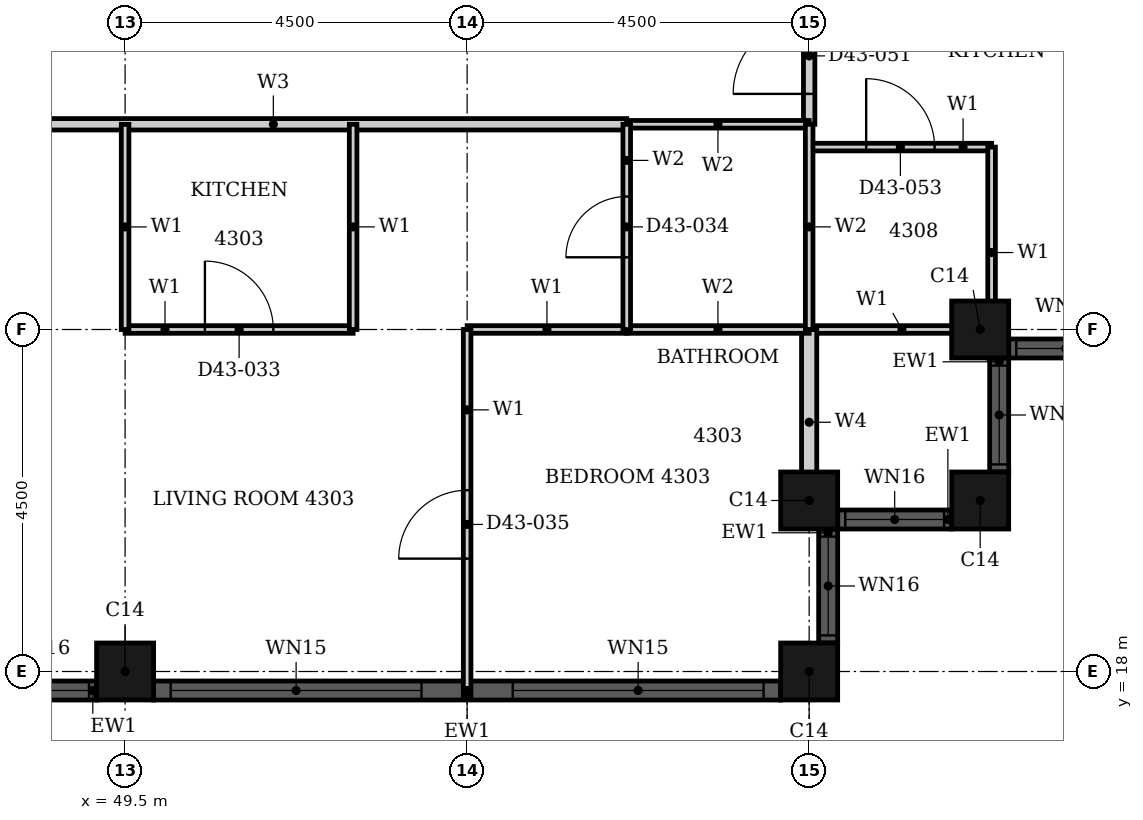
"""IFC4 building model, lengths in metres.
Left out: names, types, materials, properties, quantities, classifications, styles, units other than length and angle.
Written with IfcOpenShell. Run it as: python <this file> out.ifc"""

import sys

from ifc_helpers import new_model, si_unit, direction, frame, frame_2d, origin, origin_2d, place, context, subcontext, project, spatial, rectangle, hollow_rectangle, extrude, element, fill, save


model = new_model("IFC4")
c1 = context("Model", 3, precision=1e-05, world=origin(), true_north=direction((0.0, 1.0)))
c2 = subcontext(c1, "Body", "Model", "MODEL_VIEW")
j1 = project(units=[si_unit("LENGTHUNIT", "METRE"), si_unit("PLANEANGLEUNIT", "RADIAN")], contexts=[c1])
p1 = place(None, origin())
s1 = spatial("IfcSite", under=j1, at=p1, CompositionType="ELEMENT")
p2 = place(p1, origin())
s2 = spatial("IfcBuilding", under=s1, at=p2, CompositionType="ELEMENT")
p3 = place(p2, frame((0.0, 0.0, 172.8)))
s3 = spatial("IfcBuildingStorey", under=s2, at=p3, CompositionType="ELEMENT", Elevation=172.8)
for number, where, z_axis, x_axis in (
    (1, (49.5, 18.0, 0.0), (0.0, 0.0, 1.0), (1.0, 0.0, 0.0)),
    (2, (58.5, 18.0, 0.0), (0.0, 0.0, 1.0), (1.0, 0.0, 0.0)),
    (3, (58.5, 20.25, 0.0), (0.0, 0.0, 1.0), (1.0, 0.0, 0.0)),
    (4, (60.75, 20.25, 0.0), (0.0, 0.0, 1.0), (1.0, 0.0, 0.0)),
    (5, (60.75, 22.5, 0.0), (0.0, 0.0, 1.0), (1.0, 0.0, 0.0)),
):
    element("IfcColumn", number, at=place(p3, frame(where, z_axis=z_axis, x_axis=x_axis)), inside=s3, PredefinedType="COLUMN", context=c2, shape_type="SweptSolid", body=[
        extrude(hollow_rectangle(XDim=0.75, YDim=0.75, WallThickness=0.024, at=origin_2d()), origin(), (0.0, 0.0, 1.0), 3.7),
    ])
p4 = place(p3, frame((47.625, 17.75, 0.0), z_axis=(0.0, 0.0, 1.0), x_axis=(1.0, 0.0, 0.0)))
e6 = element("IfcWall", 6, at=p4, inside=s3, PredefinedType="SOLIDWALL", context=c2, shape_type="SweptSolid", body=[
    extrude(rectangle(XDim=1.5, YDim=0.25, at=frame_2d((0.75, 0.0))), origin(), (0.0, 0.0, 1.0), 3.7),
])
p5 = place(p4, frame((0.1, 0.0, 0.9)))
e7 = element("IfcOpeningElement", 7, at=p5, cuts=e6, PredefinedType="OPENING", context=c2, shape_type="SweptSolid", body=[
    extrude(rectangle(XDim=1.3, YDim=1.85, at=frame_2d((0.65, 0.925))), frame((0.0, 0.135, 0.0), z_axis=(0.0, -1.0, 0.0), x_axis=(1.0, 0.0, 0.0)), (0.0, 0.0, 1.0), 0.27),
])
p6 = place(p3, frame((49.875, 17.75, 0.0), z_axis=(0.0, 0.0, 1.0), x_axis=(1.0, 0.0, 0.0)))
e8 = element("IfcWall", 8, at=p6, inside=s3, PredefinedType="SOLIDWALL", context=c2, shape_type="SweptSolid", body=[
    extrude(rectangle(XDim=8.25, YDim=0.25, at=frame_2d((4.125, 0.0))), origin(), (0.0, 0.0, 1.0), 3.7),
])
p7 = place(p6, frame((0.225, 0.0, 0.45)))
e9 = element("IfcOpeningElement", 9, at=p7, cuts=e8, PredefinedType="OPENING", context=c2, shape_type="SweptSolid", body=[
    extrude(rectangle(XDim=3.3, YDim=2.3, at=frame_2d((1.65, 1.15))), frame((0.0, 0.135, 0.0), z_axis=(0.0, -1.0, 0.0), x_axis=(1.0, 0.0, 0.0)), (0.0, 0.0, 1.0), 0.27),
])
p8 = place(p6, frame((4.725, 0.0, 0.45)))
e10 = element("IfcOpeningElement", 10, at=p8, cuts=e8, PredefinedType="OPENING", context=c2, shape_type="SweptSolid", body=[
    extrude(rectangle(XDim=3.3, YDim=2.3, at=frame_2d((1.65, 1.15))), frame((0.0, 0.135, 0.0), z_axis=(0.0, -1.0, 0.0), x_axis=(1.0, 0.0, 0.0)), (0.0, 0.0, 1.0), 0.27),
])
p9 = place(p3, frame((58.75, 18.375, 0.0), z_axis=(0.0, 0.0, 1.0), x_axis=(0.0, 1.0, 0.0)))
e11 = element("IfcWall", 11, at=p9, inside=s3, PredefinedType="SOLIDWALL", context=c2, shape_type="SweptSolid", body=[
    extrude(rectangle(XDim=1.5, YDim=0.25, at=frame_2d((0.75, 0.0))), origin(), (0.0, 0.0, 1.0), 3.7),
])
p10 = place(p9, frame((0.1, 0.0, 0.9)))
e12 = element("IfcOpeningElement", 12, at=p10, cuts=e11, PredefinedType="OPENING", context=c2, shape_type="SweptSolid", body=[
    extrude(rectangle(XDim=1.3, YDim=1.85, at=frame_2d((0.65, 0.925))), frame((0.0, 0.135, 0.0), z_axis=(0.0, -1.0, 0.0), x_axis=(1.0, 0.0, 0.0)), (0.0, 0.0, 1.0), 0.27),
])
p11 = place(p3, frame((58.875, 20.0, 0.0), z_axis=(0.0, 0.0, 1.0), x_axis=(1.0, 0.0, 0.0)))
e13 = element("IfcWall", 13, at=p11, inside=s3, PredefinedType="SOLIDWALL", context=c2, shape_type="SweptSolid", body=[
    extrude(rectangle(XDim=1.5, YDim=0.25, at=frame_2d((0.75, 0.0))), origin(), (0.0, 0.0, 1.0), 3.7),
])
p12 = place(p11, frame((0.1, 0.0, 0.9)))
e14 = element("IfcOpeningElement", 14, at=p12, cuts=e13, PredefinedType="OPENING", context=c2, shape_type="SweptSolid", body=[
    extrude(rectangle(XDim=1.3, YDim=1.85, at=frame_2d((0.65, 0.925))), frame((0.0, 0.135, 0.0), z_axis=(0.0, -1.0, 0.0), x_axis=(1.0, 0.0, 0.0)), (0.0, 0.0, 1.0), 0.27),
])
p13 = place(p3, frame((61.0, 20.625, 0.0), z_axis=(0.0, 0.0, 1.0), x_axis=(0.0, 1.0, 0.0)))
e15 = element("IfcWall", 15, at=p13, inside=s3, PredefinedType="SOLIDWALL", context=c2, shape_type="SweptSolid", body=[
    extrude(rectangle(XDim=1.5, YDim=0.25, at=frame_2d((0.75, 0.0))), origin(), (0.0, 0.0, 1.0), 3.7),
])
p14 = place(p13, frame((0.1, 0.0, 0.9)))
e16 = element("IfcOpeningElement", 16, at=p14, cuts=e15, PredefinedType="OPENING", context=c2, shape_type="SweptSolid", body=[
    extrude(rectangle(XDim=1.3, YDim=1.85, at=frame_2d((0.65, 0.925))), frame((0.0, 0.135, 0.0), z_axis=(0.0, -1.0, 0.0), x_axis=(1.0, 0.0, 0.0)), (0.0, 0.0, 1.0), 0.27),
])
p15 = place(p3, frame((61.125, 22.25, 0.0), z_axis=(0.0, 0.0, 1.0), x_axis=(1.0, 0.0, 0.0)))
e17 = element("IfcWall", 17, at=p15, inside=s3, PredefinedType="SOLIDWALL", context=c2, shape_type="SweptSolid", body=[
    extrude(rectangle(XDim=1.5, YDim=0.25, at=frame_2d((0.75, 0.0))), origin(), (0.0, 0.0, 1.0), 3.7),
])
p16 = place(p15, frame((0.1, 0.0, 0.9)))
e18 = element("IfcOpeningElement", 18, at=p16, cuts=e17, PredefinedType="OPENING", context=c2, shape_type="SweptSolid", body=[
    extrude(rectangle(XDim=1.3, YDim=1.85, at=frame_2d((0.65, 0.925))), frame((0.0, 0.135, 0.0), z_axis=(0.0, -1.0, 0.0), x_axis=(1.0, 0.0, 0.0)), (0.0, 0.0, 1.0), 0.27),
])
p17 = place(p3, frame((46.801, 25.2, 0.0), z_axis=(0.0, 0.0, 1.0), x_axis=(1.0, 0.0, 0.0)))
e19 = element("IfcWall", 19, at=p17, inside=s3, PredefinedType="PARTITIONING", context=c2, shape_type="SweptSolid", body=[
    extrude(rectangle(XDim=9.299, YDim=0.15, at=frame_2d((4.649, 0.0))), origin(), (0.0, 0.0, 1.0), 3.4),
])
p18 = place(p3, frame((58.5, 25.2, 0.0), z_axis=(0.0, 0.0, 1.0), x_axis=(0.0, 1.0, 0.0)))
e20 = element("IfcWall", 20, at=p18, inside=s3, PredefinedType="PARTITIONING", context=c2, shape_type="SweptSolid", body=[
    extrude(rectangle(XDim=1.8, YDim=0.15, at=frame_2d((0.9, 0.0))), origin(), (0.0, 0.0, 1.0), 3.4),
])
p19 = place(p18, frame((0.4, 0.0, 0.0)))
e21 = element("IfcOpeningElement", 21, at=p19, cuts=e20, PredefinedType="OPENING", context=c2, shape_type="SweptSolid", body=[
    extrude(rectangle(XDim=1.0, YDim=2.2, at=frame_2d((0.5, 1.1))), frame((0.0, 0.085, 0.0), z_axis=(0.0, -1.0, 0.0), x_axis=(1.0, 0.0, 0.0)), (0.0, 0.0, 1.0), 0.17),
])
p20 = place(p3, frame((54.0, 22.5, 0.0), z_axis=(0.0, 0.0, 1.0), x_axis=(1.0, 0.0, 0.0)))
e22 = element("IfcWall", 22, at=p20, inside=s3, PredefinedType="PARTITIONING", context=c2, shape_type="SweptSolid", body=[
    extrude(rectangle(XDim=2.1, YDim=0.1, at=frame_2d((1.05, 0.0))), origin(), (0.0, 0.0, 1.0), 2.68),
])
p21 = place(p3, frame((49.5, 22.5, 0.0), z_axis=(0.0, 0.0, 1.0), x_axis=(1.0, 0.0, 0.0)))
e23 = element("IfcWall", 23, at=p21, inside=s3, PredefinedType="PARTITIONING", context=c2, shape_type="SweptSolid", body=[
    extrude(rectangle(XDim=3.0, YDim=0.1, at=frame_2d((1.5, 0.0))), origin(), (0.0, 0.0, 1.0), 2.68),
])
p22 = place(p21, frame((1.05, 0.0, 0.0)))
e24 = element("IfcOpeningElement", 24, at=p22, cuts=e23, PredefinedType="OPENING", context=c2, shape_type="SweptSolid", body=[
    extrude(rectangle(XDim=0.9, YDim=2.1, at=frame_2d((0.45, 1.05))), frame((0.0, 0.06, 0.0), z_axis=(0.0, -1.0, 0.0), x_axis=(1.0, 0.0, 0.0)), (0.0, 0.0, 1.0), 0.12),
])
p23 = place(p3, frame((58.501, 22.5, 0.0), z_axis=(0.0, 0.0, 1.0), x_axis=(1.0, 0.0, 0.0)))
e25 = element("IfcWall", 25, at=p23, inside=s3, PredefinedType="PARTITIONING", context=c2, shape_type="SweptSolid", body=[
    extrude(rectangle(XDim=2.439, YDim=0.1, at=frame_2d((1.219, 0.0))), origin(), (0.0, 0.0, 1.0), 2.68),
])
p24 = place(p3, frame((58.5, 24.9, 0.0), z_axis=(0.0, 0.0, 1.0), x_axis=(1.0, 0.0, 0.0)))
e26 = element("IfcWall", 26, at=p24, inside=s3, PredefinedType="PARTITIONING", context=c2, shape_type="SweptSolid", body=[
    extrude(rectangle(XDim=2.4, YDim=0.1, at=frame_2d((1.2, 0.0))), origin(), (0.0, 0.0, 1.0), 3.4),
])
p25 = place(p24, frame((0.75, 0.0, 0.0)))
e27 = element("IfcOpeningElement", 27, at=p25, cuts=e26, PredefinedType="OPENING", context=c2, shape_type="SweptSolid", body=[
    extrude(rectangle(XDim=0.9, YDim=2.1, at=frame_2d((0.45, 1.05))), frame((0.0, 0.06, 0.0), z_axis=(0.0, -1.0, 0.0), x_axis=(1.0, 0.0, 0.0)), (0.0, 0.0, 1.0), 0.12),
])
p26 = place(p3, frame((49.5, 22.5, 0.0), z_axis=(0.0, 0.0, 1.0), x_axis=(0.0, 1.0, 0.0)))
e28 = element("IfcWall", 28, at=p26, inside=s3, PredefinedType="PARTITIONING", context=c2, shape_type="SweptSolid", body=[
    extrude(rectangle(XDim=2.699, YDim=0.1, at=frame_2d((1.35, 0.0))), origin(), (0.0, 0.0, 1.0), 2.48),
])
p27 = place(p3, frame((52.5, 22.5, 0.0), z_axis=(0.0, 0.0, 1.0), x_axis=(0.0, 1.0, 0.0)))
e29 = element("IfcWall", 29, at=p27, inside=s3, PredefinedType="PARTITIONING", context=c2, shape_type="SweptSolid", body=[
    extrude(rectangle(XDim=2.7, YDim=0.1, at=frame_2d((1.35, 0.0))), origin(), (0.0, 0.0, 1.0), 3.4),
])
p28 = place(p3, frame((54.0, 17.685, 0.0), z_axis=(0.0, 0.0, 1.0), x_axis=(0.0, 1.0, 0.0)))
e30 = element("IfcWall", 30, at=p28, inside=s3, PredefinedType="PARTITIONING", context=c2, shape_type="SweptSolid", body=[
    extrude(rectangle(XDim=4.815, YDim=0.1, at=frame_2d((2.407, 0.0))), origin(), (0.0, 0.0, 1.0), 3.4),
])
p29 = place(p28, frame((1.8, 0.0, 0.0)))
e31 = element("IfcOpeningElement", 31, at=p29, cuts=e30, PredefinedType="OPENING", context=c2, shape_type="SweptSolid", body=[
    extrude(rectangle(XDim=0.9, YDim=2.1, at=frame_2d((0.45, 1.05))), frame((0.0, 0.06, 0.0), z_axis=(0.0, -1.0, 0.0), x_axis=(1.0, 0.0, 0.0)), (0.0, 0.0, 1.0), 0.12),
])
p30 = place(p3, frame((60.9, 22.125, 0.0), z_axis=(0.0, 0.0, 1.0), x_axis=(0.0, 1.0, 0.0)))
e32 = element("IfcWall", 32, at=p30, inside=s3, PredefinedType="PARTITIONING", context=c2, shape_type="SweptSolid", body=[
    extrude(rectangle(XDim=2.775, YDim=0.1, at=frame_2d((1.387, 0.0))), origin(), (0.0, 0.0, 1.0), 3.4),
])
p31 = place(p3, frame((58.5, 20.06, 0.0), z_axis=(0.0, 0.0, 1.0), x_axis=(0.0, 1.0, 0.0)))
e33 = element("IfcWall", 33, at=p31, inside=s3, PredefinedType="PARTITIONING", context=c2, shape_type="SweptSolid", body=[
    extrude(rectangle(XDim=2.439, YDim=0.2, at=frame_2d((1.219, 0.0))), origin(), (0.0, 0.0, 1.0), 3.4),
])
p32 = place(p3, frame((56.1, 22.5, 0.0), z_axis=(0.0, 0.0, 1.0), x_axis=(1.0, 0.0, 0.0)))
e34 = element("IfcWall", 34, at=p32, inside=s3, PredefinedType="PARTITIONING", context=c2, shape_type="SweptSolid", body=[
    extrude(rectangle(XDim=2.4, YDim=0.1, at=frame_2d((1.2, 0.0))), origin(), (0.0, 0.0, 1.0), 2.68),
])
p33 = place(p3, frame((56.1, 25.2, 0.0), z_axis=(0.0, 0.0, 1.0), x_axis=(1.0, 0.0, 0.0)))
e35 = element("IfcWall", 35, at=p33, inside=s3, PredefinedType="PARTITIONING", context=c2, shape_type="SweptSolid", body=[
    extrude(rectangle(XDim=2.4, YDim=0.1, at=frame_2d((1.2, 0.0))), origin(), (0.0, 0.0, 1.0), 3.4),
])
p34 = place(p3, frame((56.1, 22.5, 0.0), z_axis=(0.0, 0.0, 1.0), x_axis=(0.0, 1.0, 0.0)))
e36 = element("IfcWall", 36, at=p34, inside=s3, PredefinedType="PARTITIONING", context=c2, shape_type="SweptSolid", body=[
    extrude(rectangle(XDim=2.7, YDim=0.1, at=frame_2d((1.35, 0.0))), origin(), (0.0, 0.0, 1.0), 3.4),
])
p35 = place(p34, frame((0.95, 0.0, 0.0)))
e37 = element("IfcOpeningElement", 37, at=p35, cuts=e36, PredefinedType="OPENING", context=c2, shape_type="SweptSolid", body=[
    extrude(rectangle(XDim=0.8, YDim=2.1, at=frame_2d((0.4, 1.05))), frame((0.0, 0.06, 0.0), z_axis=(0.0, -1.0, 0.0), x_axis=(1.0, 0.0, 0.0)), (0.0, 0.0, 1.0), 0.12),
])
p36 = place(p3, frame((58.5, 22.5, 0.0), z_axis=(0.0, 0.0, 1.0), x_axis=(0.0, 1.0, 0.0)))
e38 = element("IfcWall", 38, at=p36, inside=s3, PredefinedType="PARTITIONING", context=c2, shape_type="SweptSolid", body=[
    extrude(rectangle(XDim=2.7, YDim=0.1, at=frame_2d((1.35, 0.0))), origin(), (0.0, 0.0, 1.0), 3.4),
])
p37 = place(p5, origin())
e39 = element("IfcWindow", 39, at=p37, inside=s3, PartitioningType="SINGLE_PANEL", PredefinedType="WINDOW", context=c2, shape_type="SweptSolid", body=[
    extrude(rectangle(XDim=1.3, YDim=1.85, at=frame_2d((0.65, 0.925))), frame((0.0, 0.03, 0.0), z_axis=(0.0, -1.0, 0.0), x_axis=(1.0, 0.0, 0.0)), (0.0, 0.0, 1.0), 0.06),
])
fill(e7, e39)
p38 = place(p7, origin())
e40 = element("IfcWindow", 40, at=p38, inside=s3, PartitioningType="SINGLE_PANEL", PredefinedType="WINDOW", context=c2, shape_type="SweptSolid", body=[
    extrude(rectangle(XDim=3.3, YDim=2.3, at=frame_2d((1.65, 1.15))), frame((0.0, 0.03, 0.0), z_axis=(0.0, -1.0, 0.0), x_axis=(1.0, 0.0, 0.0)), (0.0, 0.0, 1.0), 0.06),
])
fill(e9, e40)
p39 = place(p8, origin())
e41 = element("IfcWindow", 41, at=p39, inside=s3, PartitioningType="SINGLE_PANEL", PredefinedType="WINDOW", context=c2, shape_type="SweptSolid", body=[
    extrude(rectangle(XDim=3.3, YDim=2.3, at=frame_2d((1.65, 1.15))), frame((0.0, 0.03, 0.0), z_axis=(0.0, -1.0, 0.0), x_axis=(1.0, 0.0, 0.0)), (0.0, 0.0, 1.0), 0.06),
])
fill(e10, e41)
p40 = place(p10, origin())
e42 = element("IfcWindow", 42, at=p40, inside=s3, PartitioningType="SINGLE_PANEL", PredefinedType="WINDOW", context=c2, shape_type="SweptSolid", body=[
    extrude(rectangle(XDim=1.3, YDim=1.85, at=frame_2d((0.65, 0.925))), frame((0.0, 0.03, 0.0), z_axis=(0.0, -1.0, 0.0), x_axis=(1.0, 0.0, 0.0)), (0.0, 0.0, 1.0), 0.06),
])
fill(e12, e42)
p41 = place(p12, origin())
e43 = element("IfcWindow", 43, at=p41, inside=s3, PartitioningType="SINGLE_PANEL", PredefinedType="WINDOW", context=c2, shape_type="SweptSolid", body=[
    extrude(rectangle(XDim=1.3, YDim=1.85, at=frame_2d((0.65, 0.925))), frame((0.0, 0.03, 0.0), z_axis=(0.0, -1.0, 0.0), x_axis=(1.0, 0.0, 0.0)), (0.0, 0.0, 1.0), 0.06),
])
fill(e14, e43)
p42 = place(p14, origin())
e44 = element("IfcWindow", 44, at=p42, inside=s3, PartitioningType="SINGLE_PANEL", PredefinedType="WINDOW", context=c2, shape_type="SweptSolid", body=[
    extrude(rectangle(XDim=1.3, YDim=1.85, at=frame_2d((0.65, 0.925))), frame((0.0, 0.03, 0.0), z_axis=(0.0, -1.0, 0.0), x_axis=(1.0, 0.0, 0.0)), (0.0, 0.0, 1.0), 0.06),
])
fill(e16, e44)
p43 = place(p16, origin())
e45 = element("IfcWindow", 45, at=p43, inside=s3, PartitioningType="SINGLE_PANEL", PredefinedType="WINDOW", context=c2, shape_type="SweptSolid", body=[
    extrude(rectangle(XDim=1.3, YDim=1.85, at=frame_2d((0.65, 0.925))), frame((0.0, 0.03, 0.0), z_axis=(0.0, -1.0, 0.0), x_axis=(1.0, 0.0, 0.0)), (0.0, 0.0, 1.0), 0.06),
])
fill(e18, e45)
p44 = place(p22, origin())
e46 = element("IfcDoor", 46, at=p44, inside=s3, OperationType="SINGLE_SWING_RIGHT", PredefinedType="DOOR", context=c2, shape_type="SweptSolid", body=[
    extrude(rectangle(XDim=0.9, YDim=2.1, at=frame_2d((0.45, 1.05))), frame((0.0, 0.025, 0.0), z_axis=(0.0, -1.0, 0.0), x_axis=(1.0, 0.0, 0.0)), (0.0, 0.0, 1.0), 0.05),
])
fill(e24, e46)
p45 = place(p35, origin())
e47 = element("IfcDoor", 47, at=p45, inside=s3, OperationType="SINGLE_SWING_RIGHT", PredefinedType="DOOR", context=c2, shape_type="SweptSolid", body=[
    extrude(rectangle(XDim=0.8, YDim=2.1, at=frame_2d((0.4, 1.05))), frame((0.0, 0.025, 0.0), z_axis=(0.0, -1.0, 0.0), x_axis=(1.0, 0.0, 0.0)), (0.0, 0.0, 1.0), 0.05),
])
fill(e37, e47)
p46 = place(p29, origin())
e48 = element("IfcDoor", 48, at=p46, inside=s3, OperationType="SINGLE_SWING_RIGHT", PredefinedType="DOOR", context=c2, shape_type="SweptSolid", body=[
    extrude(rectangle(XDim=0.9, YDim=2.1, at=frame_2d((0.45, 1.05))), frame((0.0, 0.025, 0.0), z_axis=(0.0, -1.0, 0.0), x_axis=(1.0, 0.0, 0.0)), (0.0, 0.0, 1.0), 0.05),
])
fill(e31, e48)
p47 = place(p19, origin())
e49 = element("IfcDoor", 49, at=p47, inside=s3, OperationType="SINGLE_SWING_LEFT", PredefinedType="DOOR", context=c2, shape_type="SweptSolid", body=[
    extrude(rectangle(XDim=1.0, YDim=2.2, at=frame_2d((0.5, 1.1))), frame((0.0, 0.025, 0.0), z_axis=(0.0, -1.0, 0.0), x_axis=(1.0, 0.0, 0.0)), (0.0, 0.0, 1.0), 0.05),
])
fill(e21, e49)
p48 = place(p25, origin())
e50 = element("IfcDoor", 50, at=p48, inside=s3, OperationType="SINGLE_SWING_RIGHT", PredefinedType="DOOR", context=c2, shape_type="SweptSolid", body=[
    extrude(rectangle(XDim=0.9, YDim=2.1, at=frame_2d((0.45, 1.05))), frame((0.0, 0.025, 0.0), z_axis=(0.0, -1.0, 0.0), x_axis=(1.0, 0.0, 0.0)), (0.0, 0.0, 1.0), 0.05),
])
fill(e27, e50)
save(model, sys.argv[1])
